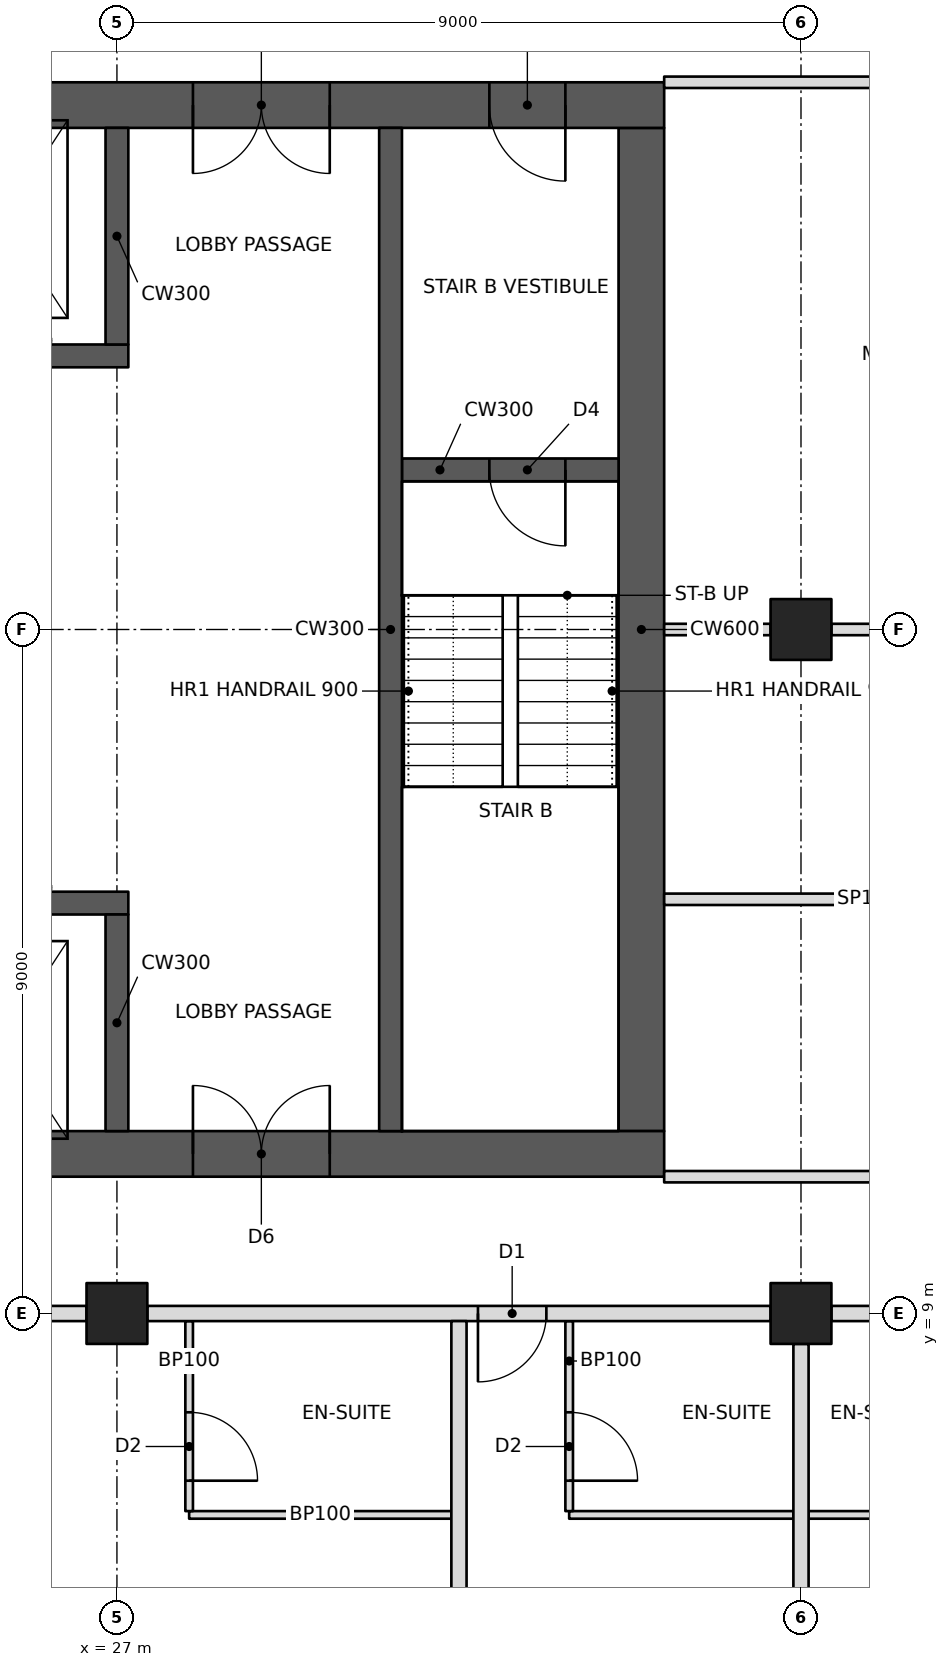
"""IFC4 building model, lengths in metres.
Left out: names, types, materials, properties, quantities, classifications, styles, units other than length and angle.
Written with IfcOpenShell. Run it as: python <this file> out.ifc"""

import sys

from ifc_helpers import new_model, si_unit, direction, frame, frame_2d, origin, origin_2d, place, context, subcontext, project, spatial, rectangle, hollow_rectangle, extrude, element, fill, save


model = new_model("IFC4")
c1 = context("Model", 3, precision=1e-05, world=origin(), true_north=direction((0.0, 1.0)))
c2 = subcontext(c1, "Body", "Model", "MODEL_VIEW")
j1 = project(units=[si_unit("LENGTHUNIT", "METRE"), si_unit("PLANEANGLEUNIT", "RADIAN")], contexts=[c1])
p1 = place(None, origin())
s1 = spatial("IfcSite", under=j1, at=p1, CompositionType="ELEMENT")
p2 = place(p1, origin())
s2 = spatial("IfcBuilding", under=s1, at=p2, CompositionType="ELEMENT")
p3 = place(p2, frame((0.0, 0.0, 82.4)))
s3 = spatial("IfcBuildingStorey", under=s2, at=p3, CompositionType="ELEMENT", Elevation=82.4)
for number, where, z_axis, x_axis in (
    (1, (27.0, 9.0, 0.0), (0.0, 0.0, 1.0), (1.0, 0.0, 0.0)),
    (2, (36.0, 9.0, 0.0), (0.0, 0.0, 1.0), (0.0, 1.0, 0.0)),
    (3, (36.0, 18.0, 0.0), (0.0, 0.0, 1.0), (0.0, 1.0, 0.0)),
):
    element("IfcColumn", number, at=place(p3, frame(where, z_axis=z_axis, x_axis=x_axis)), inside=s3, PredefinedType="COLUMN", context=c2, shape_type="SweptSolid", body=[
        extrude(hollow_rectangle(XDim=0.8, YDim=0.8, WallThickness=0.09, at=origin_2d()), origin(), (0.0, 0.0, 1.0), 3.4),
    ])
p4 = place(p3, frame((10.8, 11.1, 0.0), z_axis=(0.0, 0.0, 1.0), x_axis=(1.0, 0.0, 0.0)))
e4 = element("IfcWall", 4, at=p4, inside=s3, PredefinedType="SHEAR", context=c2, shape_type="SweptSolid", body=[
    extrude(rectangle(XDim=23.4, YDim=0.6, at=frame_2d((11.7, 0.0))), origin(), (0.0, 0.0, 1.0), 3.4),
])
p5 = place(p4, frame((1.0, 0.0, 0.0)))
e5 = element("IfcOpeningElement", 5, at=p5, cuts=e4, PredefinedType="OPENING", context=c2, shape_type="SweptSolid", body=[
    extrude(rectangle(XDim=1.0, YDim=2.1, at=frame_2d((0.5, 1.05))), frame((0.0, 0.31, 0.0), z_axis=(0.0, -1.0, 0.0), x_axis=(1.0, 0.0, 0.0)), (0.0, 0.0, 1.0), 0.62),
])
p6 = place(p4, frame((17.2, 0.0, 0.0)))
e6 = element("IfcOpeningElement", 6, at=p6, cuts=e4, PredefinedType="OPENING", context=c2, shape_type="SweptSolid", body=[
    extrude(rectangle(XDim=1.8, YDim=2.1, at=frame_2d((0.9, 1.05))), frame((0.0, 0.31, 0.0), z_axis=(0.0, -1.0, 0.0), x_axis=(1.0, 0.0, 0.0)), (0.0, 0.0, 1.0), 0.62),
])
p7 = place(p3, frame((10.8, 24.9, 0.0), z_axis=(0.0, 0.0, 1.0), x_axis=(1.0, 0.0, 0.0)))
e7 = element("IfcWall", 7, at=p7, inside=s3, PredefinedType="SHEAR", context=c2, shape_type="SweptSolid", body=[
    extrude(rectangle(XDim=23.4, YDim=0.6, at=frame_2d((11.7, 0.0))), origin(), (0.0, 0.0, 1.0), 3.4),
])
p8 = place(p7, frame((17.2, 0.0, 0.0)))
e8 = element("IfcOpeningElement", 8, at=p8, cuts=e7, PredefinedType="OPENING", context=c2, shape_type="SweptSolid", body=[
    extrude(rectangle(XDim=1.8, YDim=2.1, at=frame_2d((0.9, 1.05))), frame((0.0, 0.31, 0.0), z_axis=(0.0, -1.0, 0.0), x_axis=(1.0, 0.0, 0.0)), (0.0, 0.0, 1.0), 0.62),
])
p9 = place(p7, frame((21.1, 0.0, 0.0)))
e9 = element("IfcOpeningElement", 9, at=p9, cuts=e7, PredefinedType="OPENING", context=c2, shape_type="SweptSolid", body=[
    extrude(rectangle(XDim=1.0, YDim=2.1, at=frame_2d((0.5, 1.05))), frame((0.0, 0.31, 0.0), z_axis=(0.0, -1.0, 0.0), x_axis=(1.0, 0.0, 0.0)), (0.0, 0.0, 1.0), 0.62),
])
p10 = place(p3, frame((33.9, 11.4, 0.0), z_axis=(0.0, 0.0, 1.0), x_axis=(0.0, 1.0, 0.0)))
e10 = element("IfcWall", 10, at=p10, inside=s3, PredefinedType="SHEAR", context=c2, shape_type="SweptSolid", body=[
    extrude(rectangle(XDim=13.2, YDim=0.6, at=frame_2d((6.6, 0.0))), origin(), (0.0, 0.0, 1.0), 3.4),
])
p11 = place(p3, frame((18.15, 14.4, 0.0), z_axis=(0.0, 0.0, 1.0), x_axis=(1.0, 0.0, 0.0)))
e11 = element("IfcWall", 11, at=p11, inside=s3, PredefinedType="SHEAR", context=c2, shape_type="SweptSolid", body=[
    extrude(rectangle(XDim=9.0, YDim=0.3, at=frame_2d((4.5, 0.0))), origin(), (0.0, 0.0, 1.0), 3.4),
])
p12 = place(p11, frame((0.8, 0.0, 0.0)))
e12 = element("IfcOpeningElement", 12, at=p12, cuts=e11, PredefinedType="OPENING", context=c2, shape_type="SweptSolid", body=[
    extrude(rectangle(XDim=1.1, YDim=2.1, at=frame_2d((0.55, 1.05))), frame((0.0, 0.16, 0.0), z_axis=(0.0, -1.0, 0.0), x_axis=(1.0, 0.0, 0.0)), (0.0, 0.0, 1.0), 0.32),
])
p13 = place(p11, frame((3.8, 0.0, 0.0)))
e13 = element("IfcOpeningElement", 13, at=p13, cuts=e11, PredefinedType="OPENING", context=c2, shape_type="SweptSolid", body=[
    extrude(rectangle(XDim=1.1, YDim=2.1, at=frame_2d((0.55, 1.05))), frame((0.0, 0.16, 0.0), z_axis=(0.0, -1.0, 0.0), x_axis=(1.0, 0.0, 0.0)), (0.0, 0.0, 1.0), 0.32),
])
p14 = place(p11, frame((6.75, 0.0, 0.0)))
e14 = element("IfcOpeningElement", 14, at=p14, cuts=e11, PredefinedType="OPENING", context=c2, shape_type="SweptSolid", body=[
    extrude(rectangle(XDim=1.2, YDim=2.1, at=frame_2d((0.6, 1.05))), frame((0.0, 0.16, 0.0), z_axis=(0.0, -1.0, 0.0), x_axis=(1.0, 0.0, 0.0)), (0.0, 0.0, 1.0), 0.32),
])
p15 = place(p3, frame((27.0, 11.4, 0.0), z_axis=(0.0, 0.0, 1.0), x_axis=(0.0, 1.0, 0.0)))
e15 = element("IfcWall", 15, at=p15, inside=s3, PredefinedType="SHEAR", context=c2, shape_type="SweptSolid", body=[
    extrude(rectangle(XDim=2.85, YDim=0.3, at=frame_2d((1.425, 0.0))), origin(), (0.0, 0.0, 1.0), 3.4),
])
p16 = place(p3, frame((18.15, 21.6, 0.0), z_axis=(0.0, 0.0, 1.0), x_axis=(1.0, 0.0, 0.0)))
e16 = element("IfcWall", 16, at=p16, inside=s3, PredefinedType="SHEAR", context=c2, shape_type="SweptSolid", body=[
    extrude(rectangle(XDim=9.0, YDim=0.3, at=frame_2d((4.5, 0.0))), origin(), (0.0, 0.0, 1.0), 3.4),
])
p17 = place(p16, frame((6.75, 0.0, 0.0)))
e17 = element("IfcOpeningElement", 17, at=p17, cuts=e16, PredefinedType="OPENING", context=c2, shape_type="SweptSolid", body=[
    extrude(rectangle(XDim=1.2, YDim=2.1, at=frame_2d((0.6, 1.05))), frame((0.0, 0.16, 0.0), z_axis=(0.0, -1.0, 0.0), x_axis=(1.0, 0.0, 0.0)), (0.0, 0.0, 1.0), 0.32),
])
p18 = place(p3, frame((27.0, 21.75, 0.0), z_axis=(0.0, 0.0, 1.0), x_axis=(0.0, 1.0, 0.0)))
e18 = element("IfcWall", 18, at=p18, inside=s3, PredefinedType="SHEAR", context=c2, shape_type="SweptSolid", body=[
    extrude(rectangle(XDim=2.85, YDim=0.3, at=frame_2d((1.425, 0.0))), origin(), (0.0, 0.0, 1.0), 3.4),
])
p19 = place(p3, frame((30.6, 11.4, 0.0), z_axis=(0.0, 0.0, 1.0), x_axis=(0.0, 1.0, 0.0)))
e19 = element("IfcWall", 19, at=p19, inside=s3, PredefinedType="SHEAR", context=c2, shape_type="SweptSolid", body=[
    extrude(rectangle(XDim=13.2, YDim=0.3, at=frame_2d((6.6, 0.0))), origin(), (0.0, 0.0, 1.0), 3.4),
])
p20 = place(p3, frame((30.75, 20.1, 0.0), z_axis=(0.0, 0.0, 1.0), x_axis=(1.0, 0.0, 0.0)))
e20 = element("IfcWall", 20, at=p20, inside=s3, PredefinedType="SHEAR", context=c2, shape_type="SweptSolid", body=[
    extrude(rectangle(XDim=2.85, YDim=0.3, at=frame_2d((1.425, 0.0))), origin(), (0.0, 0.0, 1.0), 3.4),
])
p21 = place(p20, frame((1.15, 0.0, 0.0)))
e21 = element("IfcOpeningElement", 21, at=p21, cuts=e20, PredefinedType="OPENING", context=c2, shape_type="SweptSolid", body=[
    extrude(rectangle(XDim=1.0, YDim=2.1, at=frame_2d((0.5, 1.05))), frame((0.0, 0.16, 0.0), z_axis=(0.0, -1.0, 0.0), x_axis=(1.0, 0.0, 0.0)), (0.0, 0.0, 1.0), 0.32),
])
p22 = place(p3, frame((18.4, 9.0, 0.0), z_axis=(0.0, 0.0, 1.0), x_axis=(1.0, 0.0, 0.0)))
e22 = element("IfcWall", 22, at=p22, inside=s3, PredefinedType="PARTITIONING", context=c2, shape_type="SweptSolid", body=[
    extrude(rectangle(XDim=8.2, YDim=0.2, at=frame_2d((4.1, 0.0))), origin(), (0.0, 0.0, 1.0), 2.405),
])
p23 = place(p22, frame((2.95, 0.0, 0.0)))
e23 = element("IfcOpeningElement", 23, at=p23, cuts=e22, PredefinedType="OPENING", context=c2, shape_type="SweptSolid", body=[
    extrude(rectangle(XDim=0.9, YDim=2.1, at=frame_2d((0.45, 1.05))), frame((0.0, 0.11, 0.0), z_axis=(0.0, -1.0, 0.0), x_axis=(1.0, 0.0, 0.0)), (0.0, 0.0, 1.0), 0.22),
])
p24 = place(p22, frame((4.35, 0.0, 0.0)))
e24 = element("IfcOpeningElement", 24, at=p24, cuts=e22, PredefinedType="OPENING", context=c2, shape_type="SweptSolid", body=[
    extrude(rectangle(XDim=0.9, YDim=2.1, at=frame_2d((0.45, 1.05))), frame((0.0, 0.11, 0.0), z_axis=(0.0, -1.0, 0.0), x_axis=(1.0, 0.0, 0.0)), (0.0, 0.0, 1.0), 0.22),
])
p25 = place(p3, frame((27.4, 9.0, 0.0), z_axis=(0.0, 0.0, 1.0), x_axis=(1.0, 0.0, 0.0)))
e25 = element("IfcWall", 25, at=p25, inside=s3, PredefinedType="PARTITIONING", context=c2, shape_type="SweptSolid", body=[
    extrude(rectangle(XDim=8.2, YDim=0.2, at=frame_2d((4.1, 0.0))), origin(), (0.0, 0.0, 1.0), 2.405),
])
p26 = place(p25, frame((4.35, 0.0, 0.0)))
e26 = element("IfcOpeningElement", 26, at=p26, cuts=e25, PredefinedType="OPENING", context=c2, shape_type="SweptSolid", body=[
    extrude(rectangle(XDim=0.9, YDim=2.1, at=frame_2d((0.45, 1.05))), frame((0.0, 0.11, 0.0), z_axis=(0.0, -1.0, 0.0), x_axis=(1.0, 0.0, 0.0)), (0.0, 0.0, 1.0), 0.22),
])
p27 = place(p3, frame((36.4, 9.0, 0.0), z_axis=(0.0, 0.0, 1.0), x_axis=(1.0, 0.0, 0.0)))
e27 = element("IfcWall", 27, at=p27, inside=s3, PredefinedType="PARTITIONING", context=c2, shape_type="SweptSolid", body=[
    extrude(rectangle(XDim=8.2, YDim=0.2, at=frame_2d((4.1, 0.0))), origin(), (0.0, 0.0, 1.0), 2.438),
])
p28 = place(p27, frame((2.95, 0.0, 0.0)))
e28 = element("IfcOpeningElement", 28, at=p28, cuts=e27, PredefinedType="OPENING", context=c2, shape_type="SweptSolid", body=[
    extrude(rectangle(XDim=0.9, YDim=2.1, at=frame_2d((0.45, 1.05))), frame((0.0, 0.11, 0.0), z_axis=(0.0, -1.0, 0.0), x_axis=(1.0, 0.0, 0.0)), (0.0, 0.0, 1.0), 0.22),
])
p29 = place(p27, frame((4.35, 0.0, 0.0)))
e29 = element("IfcOpeningElement", 29, at=p29, cuts=e27, PredefinedType="OPENING", context=c2, shape_type="SweptSolid", body=[
    extrude(rectangle(XDim=0.9, YDim=2.1, at=frame_2d((0.45, 1.05))), frame((0.0, 0.11, 0.0), z_axis=(0.0, -1.0, 0.0), x_axis=(1.0, 0.0, 0.0)), (0.0, 0.0, 1.0), 0.22),
])
p30 = place(p3, frame((34.2, 10.8, 0.0), z_axis=(0.0, 0.0, 1.0), x_axis=(1.0, 0.0, 0.0)))
e30 = element("IfcWall", 30, at=p30, inside=s3, PredefinedType="PARTITIONING", context=c2, shape_type="SweptSolid", body=[
    extrude(rectangle(XDim=9.075, YDim=0.15, at=frame_2d((4.538, 0.0))), origin(), (0.0, 0.0, 1.0), 2.404),
])
p31 = place(p30, frame((3.0, 0.0, 0.0)))
e31 = element("IfcOpeningElement", 31, at=p31, cuts=e30, PredefinedType="OPENING", context=c2, shape_type="SweptSolid", body=[
    extrude(rectangle(XDim=1.0, YDim=2.1, at=frame_2d((0.5, 1.05))), frame((0.0, 0.085, 0.0), z_axis=(0.0, -1.0, 0.0), x_axis=(1.0, 0.0, 0.0)), (0.0, 0.0, 1.0), 0.17),
])
p32 = place(p3, frame((34.2, 25.2, 0.0), z_axis=(0.0, 0.0, 1.0), x_axis=(1.0, 0.0, 0.0)))
e32 = element("IfcWall", 32, at=p32, inside=s3, PredefinedType="PARTITIONING", context=c2, shape_type="SweptSolid", body=[
    extrude(rectangle(XDim=9.075, YDim=0.15, at=frame_2d((4.538, 0.0))), origin(), (0.0, 0.0, 1.0), 2.404),
])
p33 = place(p32, frame((3.0, 0.0, 0.0)))
e33 = element("IfcOpeningElement", 33, at=p33, cuts=e32, PredefinedType="OPENING", context=c2, shape_type="SweptSolid", body=[
    extrude(rectangle(XDim=1.0, YDim=2.1, at=frame_2d((0.5, 1.05))), frame((0.0, 0.085, 0.0), z_axis=(0.0, -1.0, 0.0), x_axis=(1.0, 0.0, 0.0)), (0.0, 0.0, 1.0), 0.17),
])
p34 = place(p3, frame((34.2, 18.0, 0.0), z_axis=(0.0, 0.0, 1.0), x_axis=(1.0, 0.0, 0.0)))
e34 = element("IfcWall", 34, at=p34, inside=s3, PredefinedType="PARTITIONING", context=c2, shape_type="SweptSolid", body=[
    extrude(rectangle(XDim=1.4, YDim=0.15, at=frame_2d((0.7, 0.0))), origin(), (0.0, 0.0, 1.0), 3.2),
])
p35 = place(p3, frame((36.4, 18.0, 0.0), z_axis=(0.0, 0.0, 1.0), x_axis=(1.0, 0.0, 0.0)))
e35 = element("IfcWall", 35, at=p35, inside=s3, PredefinedType="PARTITIONING", context=c2, shape_type="SweptSolid", body=[
    extrude(rectangle(XDim=6.725, YDim=0.15, at=frame_2d((3.363, 0.0))), origin(), (0.0, 0.0, 1.0), 2.405),
])
p36 = place(p3, frame((34.2, 14.45, 0.0), z_axis=(0.0, 0.0, 1.0), x_axis=(1.0, 0.0, 0.0)))
e36 = element("IfcWall", 36, at=p36, inside=s3, PredefinedType="PARTITIONING", context=c2, shape_type="SweptSolid", body=[
    extrude(rectangle(XDim=9.0, YDim=0.15, at=frame_2d((4.5, 0.0))), origin(), (0.0, 0.0, 1.0), 2.404),
])
p37 = place(p36, frame((5.5, 0.0, 0.0)))
e37 = element("IfcOpeningElement", 37, at=p37, cuts=e36, PredefinedType="OPENING", context=c2, shape_type="SweptSolid", body=[
    extrude(rectangle(XDim=1.0, YDim=2.1, at=frame_2d((0.5, 1.05))), frame((0.0, 0.085, 0.0), z_axis=(0.0, -1.0, 0.0), x_axis=(1.0, 0.0, 0.0)), (0.0, 0.0, 1.0), 0.17),
])
p38 = place(p3, frame((31.5, 8.9, 0.0), z_axis=(0.0, 0.0, 1.0), x_axis=(0.0, -1.0, 0.0)))
e38 = element("IfcWall", 38, at=p38, inside=s3, PredefinedType="PARTITIONING", context=c2, shape_type="SweptSolid", body=[
    extrude(rectangle(XDim=7.9, YDim=0.2, at=frame_2d((3.95, 0.0))), origin(), (0.0, 0.0, 1.0), 2.404),
])
p39 = place(p3, frame((36.0, 8.6, 0.0), z_axis=(0.0, 0.0, 1.0), x_axis=(0.0, -1.0, 0.0)))
e39 = element("IfcWall", 39, at=p39, inside=s3, PredefinedType="PARTITIONING", context=c2, shape_type="SweptSolid", body=[
    extrude(rectangle(XDim=7.6, YDim=0.2, at=frame_2d((3.8, 0.0))), origin(), (0.0, 0.0, 1.0), 2.438),
])
p40 = place(p3, frame((27.95, 6.35, 0.0), z_axis=(0.0, 0.0, 1.0), x_axis=(1.0, 0.0, 0.0)))
e40 = element("IfcWall", 40, at=p40, inside=s3, PredefinedType="PARTITIONING", context=c2, shape_type="SweptSolid", body=[
    extrude(rectangle(XDim=3.45, YDim=0.1, at=frame_2d((1.725, 0.0))), origin(), (0.0, 0.0, 1.0), 3.2),
])
p41 = place(p3, frame((27.95, 8.9, 0.0), z_axis=(0.0, 0.0, 1.0), x_axis=(0.0, -1.0, 0.0)))
e41 = element("IfcWall", 41, at=p41, inside=s3, PredefinedType="PARTITIONING", context=c2, shape_type="SweptSolid", body=[
    extrude(rectangle(XDim=2.5, YDim=0.1, at=frame_2d((1.25, 0.0))), origin(), (0.0, 0.0, 1.0), 2.404),
])
p42 = place(p41, frame((1.2, 0.0, 0.0)))
e42 = element("IfcOpeningElement", 42, at=p42, cuts=e41, PredefinedType="OPENING", context=c2, shape_type="SweptSolid", body=[
    extrude(rectangle(XDim=0.9, YDim=2.1, at=frame_2d((0.45, 1.05))), frame((0.0, 0.06, 0.0), z_axis=(0.0, -1.0, 0.0), x_axis=(1.0, 0.0, 0.0)), (0.0, 0.0, 1.0), 0.12),
])
p43 = place(p3, frame((32.95, 6.35, 0.0), z_axis=(0.0, 0.0, 1.0), x_axis=(1.0, 0.0, 0.0)))
e43 = element("IfcWall", 43, at=p43, inside=s3, PredefinedType="PARTITIONING", context=c2, shape_type="SweptSolid", body=[
    extrude(rectangle(XDim=2.95, YDim=0.1, at=frame_2d((1.475, 0.0))), origin(), (0.0, 0.0, 1.0), 2.438),
])
p44 = place(p3, frame((32.95, 8.9, 0.0), z_axis=(0.0, 0.0, 1.0), x_axis=(0.0, -1.0, 0.0)))
e44 = element("IfcWall", 44, at=p44, inside=s3, PredefinedType="PARTITIONING", context=c2, shape_type="SweptSolid", body=[
    extrude(rectangle(XDim=2.5, YDim=0.1, at=frame_2d((1.25, 0.0))), origin(), (0.0, 0.0, 1.0), 2.404),
])
p45 = place(p44, frame((1.2, 0.0, 0.0)))
e45 = element("IfcOpeningElement", 45, at=p45, cuts=e44, PredefinedType="OPENING", context=c2, shape_type="SweptSolid", body=[
    extrude(rectangle(XDim=0.9, YDim=2.1, at=frame_2d((0.45, 1.05))), frame((0.0, 0.06, 0.0), z_axis=(0.0, -1.0, 0.0), x_axis=(1.0, 0.0, 0.0)), (0.0, 0.0, 1.0), 0.12),
])
p46 = place(p3, frame((36.1, 6.35, 0.0), z_axis=(0.0, 0.0, 1.0), x_axis=(1.0, 0.0, 0.0)))
e46 = element("IfcWall", 46, at=p46, inside=s3, PredefinedType="PARTITIONING", context=c2, shape_type="SweptSolid", body=[
    extrude(rectangle(XDim=2.95, YDim=0.1, at=frame_2d((1.475, 0.0))), origin(), (0.0, 0.0, 1.0), 2.438),
])
p47 = place(p42, origin())
e47 = element("IfcDoor", 47, at=p47, inside=s3, OperationType="SINGLE_SWING_RIGHT", PredefinedType="DOOR", context=c2, shape_type="SweptSolid", body=[
    extrude(rectangle(XDim=0.9, YDim=2.1, at=frame_2d((0.45, 1.05))), frame((0.0, 0.025, 0.0), z_axis=(0.0, -1.0, 0.0), x_axis=(1.0, 0.0, 0.0)), (0.0, 0.0, 1.0), 0.05),
])
fill(e42, e47)
p48 = place(p45, origin())
e48 = element("IfcDoor", 48, at=p48, inside=s3, OperationType="SINGLE_SWING_RIGHT", PredefinedType="DOOR", context=c2, shape_type="SweptSolid", body=[
    extrude(rectangle(XDim=0.9, YDim=2.1, at=frame_2d((0.45, 1.05))), frame((0.0, 0.025, 0.0), z_axis=(0.0, -1.0, 0.0), x_axis=(1.0, 0.0, 0.0)), (0.0, 0.0, 1.0), 0.05),
])
fill(e45, e48)
p49 = place(p26, frame((0.9, 0.0, 0.0), z_axis=(0.0, 0.0, 1.0), x_axis=(-1.0, 0.0, 0.0)))
e49 = element("IfcDoor", 49, at=p49, inside=s3, OperationType="SINGLE_SWING_RIGHT", PredefinedType="DOOR", context=c2, shape_type="SweptSolid", body=[
    extrude(rectangle(XDim=0.9, YDim=2.1, at=frame_2d((0.45, 1.05))), frame((0.0, 0.025, 0.0), z_axis=(0.0, -1.0, 0.0), x_axis=(1.0, 0.0, 0.0)), (0.0, 0.0, 1.0), 0.05),
])
fill(e26, e49)
p50 = place(p6, origin())
e50 = element("IfcDoor", 50, at=p50, inside=s3, OperationType="DOUBLE_DOOR_SINGLE_SWING", PredefinedType="DOOR", context=c2, shape_type="SweptSolid", body=[
    extrude(rectangle(XDim=1.8, YDim=2.1, at=frame_2d((0.9, 1.05))), frame((0.0, 0.025, 0.0), z_axis=(0.0, -1.0, 0.0), x_axis=(1.0, 0.0, 0.0)), (0.0, 0.0, 1.0), 0.05),
])
fill(e6, e50)
p51 = place(p8, frame((1.8, 0.0, 0.0), z_axis=(0.0, 0.0, 1.0), x_axis=(-1.0, 0.0, 0.0)))
e51 = element("IfcDoor", 51, at=p51, inside=s3, OperationType="DOUBLE_DOOR_SINGLE_SWING", PredefinedType="DOOR", context=c2, shape_type="SweptSolid", body=[
    extrude(rectangle(XDim=1.8, YDim=2.1, at=frame_2d((0.9, 1.05))), frame((0.0, 0.025, 0.0), z_axis=(0.0, -1.0, 0.0), x_axis=(1.0, 0.0, 0.0)), (0.0, 0.0, 1.0), 0.05),
])
fill(e8, e51)
p52 = place(p9, frame((1.0, 0.0, 0.0), z_axis=(0.0, 0.0, 1.0), x_axis=(-1.0, 0.0, 0.0)))
e52 = element("IfcDoor", 52, at=p52, inside=s3, OperationType="SINGLE_SWING_LEFT", PredefinedType="DOOR", context=c2, shape_type="SweptSolid", body=[
    extrude(rectangle(XDim=1.0, YDim=2.1, at=frame_2d((0.5, 1.05))), frame((0.0, 0.025, 0.0), z_axis=(0.0, -1.0, 0.0), x_axis=(1.0, 0.0, 0.0)), (0.0, 0.0, 1.0), 0.05),
])
fill(e9, e52)
p53 = place(p21, frame((1.0, 0.0, 0.0), z_axis=(0.0, 0.0, 1.0), x_axis=(-1.0, 0.0, 0.0)))
e53 = element("IfcDoor", 53, at=p53, inside=s3, OperationType="SINGLE_SWING_LEFT", PredefinedType="DOOR", context=c2, shape_type="SweptSolid", body=[
    extrude(rectangle(XDim=1.0, YDim=2.1, at=frame_2d((0.5, 1.05))), frame((0.0, 0.025, 0.0), z_axis=(0.0, -1.0, 0.0), x_axis=(1.0, 0.0, 0.0)), (0.0, 0.0, 1.0), 0.05),
])
fill(e21, e53)
save(model, sys.argv[1])
